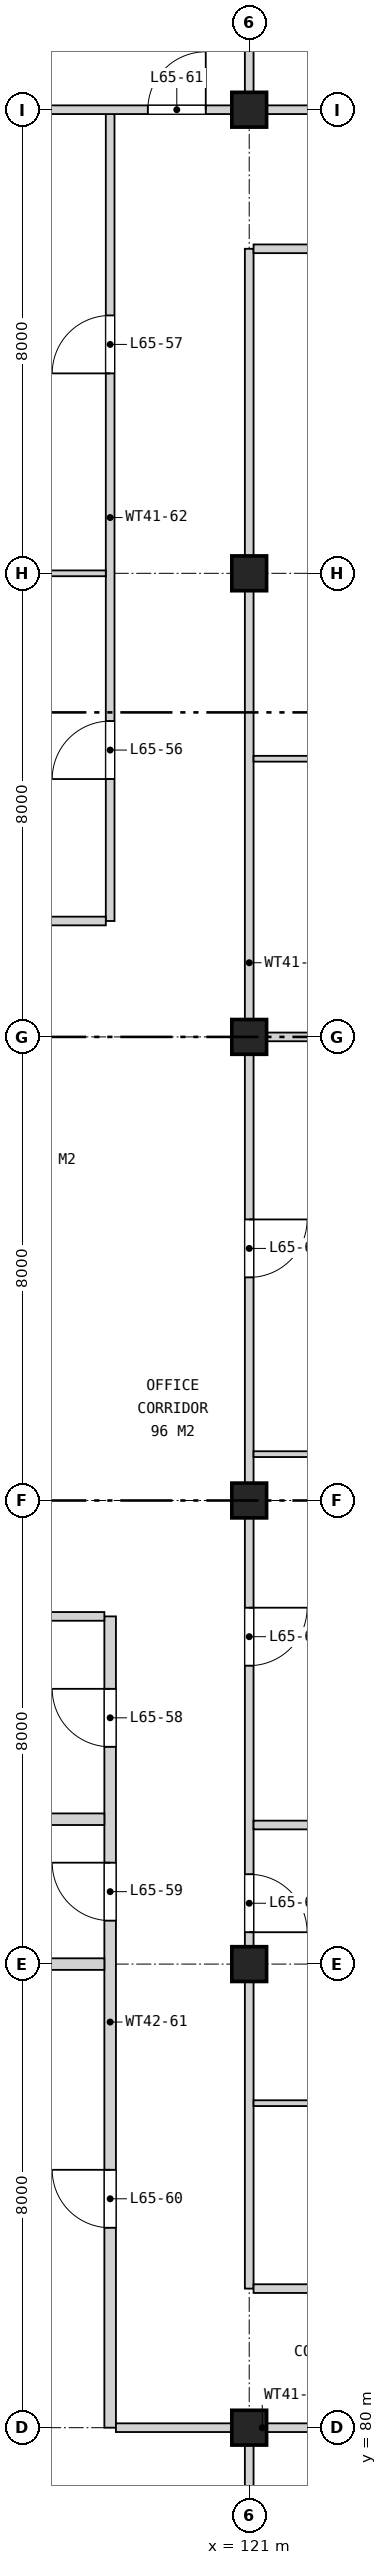
"""IFC4 building model, lengths in metres.
Left out: names, types, materials, properties, quantities, classifications, styles, units other than length and angle.
Written with IfcOpenShell. Run it as: python <this file> out.ifc"""

import sys

from ifc_helpers import new_model, si_unit, direction, frame, frame_2d, origin, origin_2d, place, context, subcontext, project, spatial, rectangle, extrude, element, fill, save


model = new_model("IFC4")
c1 = context("Model", 3, precision=1e-05, world=origin(), true_north=direction((0.0, 1.0)))
c2 = subcontext(c1, "Body", "Model", "MODEL_VIEW")
j1 = project(units=[si_unit("LENGTHUNIT", "METRE"), si_unit("PLANEANGLEUNIT", "RADIAN")], contexts=[c1])
p1 = place(None, origin())
s1 = spatial("IfcSite", under=j1, at=p1, CompositionType="ELEMENT")
p2 = place(p1, origin())
s2 = spatial("IfcBuilding", under=s1, at=p2, CompositionType="ELEMENT")
p3 = place(p2, frame((0.0, 0.0, 299.7)))
s3 = spatial("IfcBuildingStorey", under=s2, at=p3, CompositionType="ELEMENT", Elevation=299.7)
for number, where, z_axis, x_axis in (
    (1, (121.0, 80.0, 0.0), (0.0, 0.0, 1.0), (1.0, 0.0, 0.0)),
    (2, (121.0, 88.0, 0.0), (0.0, 0.0, 1.0), (1.0, 0.0, 0.0)),
    (3, (121.0, 96.0, 0.0), (0.0, 0.0, 1.0), (1.0, 0.0, 0.0)),
    (4, (121.0, 104.0, 0.0), (0.0, 0.0, 1.0), (1.0, 0.0, 0.0)),
    (5, (121.0, 112.0, 0.0), (0.0, 0.0, 1.0), (1.0, 0.0, 0.0)),
    (6, (121.0, 120.0, 0.0), (0.0, 0.0, 1.0), (1.0, 0.0, 0.0)),
):
    element("IfcColumn", number, at=place(p3, frame(where, z_axis=z_axis, x_axis=x_axis)), inside=s3, PredefinedType="COLUMN", context=c2, shape_type="SweptSolid", body=[
        extrude(rectangle(XDim=0.6, YDim=0.6, at=origin_2d()), origin(), (0.0, 0.0, 1.0), 4.2),
    ])
p4 = place(p3, frame((118.6, 80.0, 0.0), z_axis=(0.0, 0.0, 1.0), x_axis=(0.0, 1.0, 0.0)))
e7 = element("IfcWall", 7, at=p4, inside=s3, PredefinedType="SOLIDWALL", context=c2, shape_type="SweptSolid", body=[
    extrude(rectangle(XDim=14.0, YDim=0.2, at=frame_2d((7.0, 0.0))), origin(), (0.0, 0.0, 1.0), 3.255),
])
p5 = place(p4, frame((11.75, 0.0, 0.0)))
e8 = element("IfcOpeningElement", 8, at=p5, cuts=e7, PredefinedType="OPENING", context=c2, shape_type="SweptSolid", body=[
    extrude(rectangle(XDim=1.0, YDim=2.1, at=frame_2d((0.5, 1.05))), frame((0.0, 0.11, 0.0), z_axis=(0.0, -1.0, 0.0), x_axis=(1.0, 0.0, 0.0)), (0.0, 0.0, 1.0), 0.22),
])
p6 = place(p4, frame((8.75, 0.0, 0.0)))
e9 = element("IfcOpeningElement", 9, at=p6, cuts=e7, PredefinedType="OPENING", context=c2, shape_type="SweptSolid", body=[
    extrude(rectangle(XDim=1.0, YDim=2.1, at=frame_2d((0.5, 1.05))), frame((0.0, 0.11, 0.0), z_axis=(0.0, -1.0, 0.0), x_axis=(1.0, 0.0, 0.0)), (0.0, 0.0, 1.0), 0.22),
])
p7 = place(p4, frame((3.45, 0.0, 0.0)))
e10 = element("IfcOpeningElement", 10, at=p7, cuts=e7, PredefinedType="OPENING", context=c2, shape_type="SweptSolid", body=[
    extrude(rectangle(XDim=1.0, YDim=2.1, at=frame_2d((0.5, 1.05))), frame((0.0, 0.11, 0.0), z_axis=(0.0, -1.0, 0.0), x_axis=(1.0, 0.0, 0.0)), (0.0, 0.0, 1.0), 0.22),
])
p8 = place(p3, frame((118.6, 106.0, 0.0), z_axis=(0.0, 0.0, 1.0), x_axis=(0.0, 1.0, 0.0)))
e11 = element("IfcWall", 11, at=p8, inside=s3, PredefinedType="PARTITIONING", context=c2, shape_type="SweptSolid", body=[
    extrude(rectangle(XDim=13.925, YDim=0.15, at=frame_2d((6.962, 0.0))), origin(), (0.0, 0.0, 1.0), 3.255),
])
p9 = place(p8, frame((2.45, 0.0, 0.0)))
e12 = element("IfcOpeningElement", 12, at=p9, cuts=e11, PredefinedType="OPENING", context=c2, shape_type="SweptSolid", body=[
    extrude(rectangle(XDim=1.0, YDim=2.1, at=frame_2d((0.5, 1.05))), frame((0.0, 0.085, 0.0), z_axis=(0.0, -1.0, 0.0), x_axis=(1.0, 0.0, 0.0)), (0.0, 0.0, 1.0), 0.17),
])
p10 = place(p8, frame((9.45, 0.0, 0.0)))
e13 = element("IfcOpeningElement", 13, at=p10, cuts=e11, PredefinedType="OPENING", context=c2, shape_type="SweptSolid", body=[
    extrude(rectangle(XDim=1.0, YDim=2.1, at=frame_2d((0.5, 1.05))), frame((0.0, 0.085, 0.0), z_axis=(0.0, -1.0, 0.0), x_axis=(1.0, 0.0, 0.0)), (0.0, 0.0, 1.0), 0.17),
])
p11 = place(p3, frame((121.0, 71.78, 0.0), z_axis=(0.0, 0.0, 1.0), x_axis=(0.0, 1.0, 0.0)))
e14 = element("IfcWall", 14, at=p11, inside=s3, PredefinedType="PARTITIONING", context=c2, shape_type="SweptSolid", body=[
    extrude(rectangle(XDim=8.145, YDim=0.15, at=frame_2d((4.073, 0.0))), origin(), (0.0, 0.0, 1.0), 3.255),
])
p12 = place(p3, frame((121.0, 82.4, 0.0), z_axis=(0.0, 0.0, 1.0), x_axis=(0.0, 1.0, 0.0)))
e15 = element("IfcWall", 15, at=p12, inside=s3, PredefinedType="PARTITIONING", context=c2, shape_type="SweptSolid", body=[
    extrude(rectangle(XDim=35.2, YDim=0.15, at=frame_2d((17.6, 0.0))), origin(), (0.0, 0.0, 1.0), 3.255),
])
p13 = place(p12, frame((6.15, 0.0, 0.0)))
e16 = element("IfcOpeningElement", 16, at=p13, cuts=e15, PredefinedType="OPENING", context=c2, shape_type="SweptSolid", body=[
    extrude(rectangle(XDim=1.0, YDim=2.1, at=frame_2d((0.5, 1.05))), frame((0.0, 0.085, 0.0), z_axis=(0.0, -1.0, 0.0), x_axis=(1.0, 0.0, 0.0)), (0.0, 0.0, 1.0), 0.17),
])
p14 = place(p12, frame((10.75, 0.0, 0.0)))
e17 = element("IfcOpeningElement", 17, at=p14, cuts=e15, PredefinedType="OPENING", context=c2, shape_type="SweptSolid", body=[
    extrude(rectangle(XDim=1.0, YDim=2.1, at=frame_2d((0.5, 1.05))), frame((0.0, 0.085, 0.0), z_axis=(0.0, -1.0, 0.0), x_axis=(1.0, 0.0, 0.0)), (0.0, 0.0, 1.0), 0.17),
])
p15 = place(p12, frame((17.45, 0.0, 0.0)))
e18 = element("IfcOpeningElement", 18, at=p15, cuts=e15, PredefinedType="OPENING", context=c2, shape_type="SweptSolid", body=[
    extrude(rectangle(XDim=1.0, YDim=2.1, at=frame_2d((0.5, 1.05))), frame((0.0, 0.085, 0.0), z_axis=(0.0, -1.0, 0.0), x_axis=(1.0, 0.0, 0.0)), (0.0, 0.0, 1.0), 0.17),
])
p16 = place(p3, frame((121.0, 120.075, 0.0), z_axis=(0.0, 0.0, 1.0), x_axis=(0.0, 1.0, 0.0)))
e19 = element("IfcWall", 19, at=p16, inside=s3, PredefinedType="PARTITIONING", context=c2, shape_type="SweptSolid", body=[
    extrude(rectangle(XDim=8.145, YDim=0.15, at=frame_2d((4.073, 0.0))), origin(), (0.0, 0.0, 1.0), 3.255),
])
p17 = place(p3, frame((118.7, 80.0, 0.0), z_axis=(0.0, 0.0, 1.0), x_axis=(1.0, 0.0, 0.0)))
e20 = element("IfcWall", 20, at=p17, inside=s3, PredefinedType="PARTITIONING", context=c2, shape_type="SweptSolid", body=[
    extrude(rectangle(XDim=12.625, YDim=0.15, at=frame_2d((6.312, 0.0))), origin(), (0.0, 0.0, 1.0), 3.255),
])
p18 = place(p17, frame((5.85, 0.0, 0.0)))
e21 = element("IfcOpeningElement", 21, at=p18, cuts=e20, PredefinedType="OPENING", context=c2, shape_type="SweptSolid", body=[
    extrude(rectangle(XDim=1.0, YDim=2.1, at=frame_2d((0.5, 1.05))), frame((0.0, 0.085, 0.0), z_axis=(0.0, -1.0, 0.0), x_axis=(1.0, 0.0, 0.0)), (0.0, 0.0, 1.0), 0.17),
])
p19 = place(p3, frame((121.075, 82.4, 0.0), z_axis=(0.0, 0.0, 1.0), x_axis=(1.0, 0.0, 0.0)))
e22 = element("IfcWall", 22, at=p19, inside=s3, PredefinedType="PARTITIONING", context=c2, shape_type="SweptSolid", body=[
    extrude(rectangle(XDim=7.85, YDim=0.15, at=frame_2d((3.925, 0.0))), origin(), (0.0, 0.0, 1.0), 3.255),
])
p20 = place(p19, frame((3.45, 0.0, 0.0)))
e23 = element("IfcOpeningElement", 23, at=p20, cuts=e22, PredefinedType="OPENING", context=c2, shape_type="SweptSolid", body=[
    extrude(rectangle(XDim=1.0, YDim=2.1, at=frame_2d((0.5, 1.05))), frame((0.0, 0.085, 0.0), z_axis=(0.0, -1.0, 0.0), x_axis=(1.0, 0.0, 0.0)), (0.0, 0.0, 1.0), 0.17),
])
p21 = place(p3, frame((121.075, 85.6, 0.0), z_axis=(0.0, 0.0, 1.0), x_axis=(1.0, 0.0, 0.0)))
e24 = element("IfcWall", 24, at=p21, inside=s3, PredefinedType="PARTITIONING", context=c2, shape_type="SweptSolid", body=[
    extrude(rectangle(XDim=7.85, YDim=0.1, at=frame_2d((3.925, 0.0))), origin(), (0.0, 0.0, 1.0), 3.255),
])
p22 = place(p3, frame((113.0, 88.0, 0.0), z_axis=(0.0, 0.0, 1.0), x_axis=(1.0, 0.0, 0.0)))
e25 = element("IfcWall", 25, at=p22, inside=s3, PredefinedType="SOLIDWALL", context=c2, shape_type="SweptSolid", body=[
    extrude(rectangle(XDim=5.5, YDim=0.2, at=frame_2d((2.75, 0.0))), origin(), (0.0, 0.0, 1.0), 3.255),
])
p23 = place(p3, frame((121.075, 90.4, 0.0), z_axis=(0.0, 0.0, 1.0), x_axis=(1.0, 0.0, 0.0)))
e26 = element("IfcWall", 26, at=p23, inside=s3, PredefinedType="PARTITIONING", context=c2, shape_type="SweptSolid", body=[
    extrude(rectangle(XDim=7.85, YDim=0.15, at=frame_2d((3.925, 0.0))), origin(), (0.0, 0.0, 1.0), 3.255),
])
p24 = place(p3, frame((113.0, 90.5, 0.0), z_axis=(0.0, 0.0, 1.0), x_axis=(1.0, 0.0, 0.0)))
e27 = element("IfcWall", 27, at=p24, inside=s3, PredefinedType="SOLIDWALL", context=c2, shape_type="SweptSolid", body=[
    extrude(rectangle(XDim=5.5, YDim=0.2, at=frame_2d((2.75, 0.0))), origin(), (0.0, 0.0, 1.0), 3.255),
])
p25 = place(p3, frame((113.0, 94.0, 0.0), z_axis=(0.0, 0.0, 1.0), x_axis=(1.0, 0.0, 0.0)))
e28 = element("IfcWall", 28, at=p25, inside=s3, PredefinedType="PARTITIONING", context=c2, shape_type="SweptSolid", body=[
    extrude(rectangle(XDim=5.5, YDim=0.15, at=frame_2d((2.75, 0.0))), origin(), (0.0, 0.0, 1.0), 3.255),
])
p26 = place(p3, frame((121.075, 104.0, 0.0), z_axis=(0.0, 0.0, 1.0), x_axis=(1.0, 0.0, 0.0)))
e29 = element("IfcWall", 29, at=p26, inside=s3, PredefinedType="PARTITIONING", context=c2, shape_type="SweptSolid", body=[
    extrude(rectangle(XDim=7.85, YDim=0.15, at=frame_2d((3.925, 0.0))), origin(), (0.0, 0.0, 1.0), 3.255),
])
p27 = place(p3, frame((113.0, 106.0, 0.0), z_axis=(0.0, 0.0, 1.0), x_axis=(1.0, 0.0, 0.0)))
e30 = element("IfcWall", 30, at=p27, inside=s3, PredefinedType="PARTITIONING", context=c2, shape_type="SweptSolid", body=[
    extrude(rectangle(XDim=5.525, YDim=0.15, at=frame_2d((2.762, 0.0))), origin(), (0.0, 0.0, 1.0), 3.255),
])
p28 = place(p3, frame((121.075, 108.8, 0.0), z_axis=(0.0, 0.0, 1.0), x_axis=(1.0, 0.0, 0.0)))
e31 = element("IfcWall", 31, at=p28, inside=s3, PredefinedType="PARTITIONING", context=c2, shape_type="SweptSolid", body=[
    extrude(rectangle(XDim=7.85, YDim=0.1, at=frame_2d((3.925, 0.0))), origin(), (0.0, 0.0, 1.0), 3.255),
])
p29 = place(p3, frame((113.0, 112.0, 0.0), z_axis=(0.0, 0.0, 1.0), x_axis=(1.0, 0.0, 0.0)))
e32 = element("IfcWall", 32, at=p29, inside=s3, PredefinedType="PARTITIONING", context=c2, shape_type="SweptSolid", body=[
    extrude(rectangle(XDim=5.525, YDim=0.1, at=frame_2d((2.762, 0.0))), origin(), (0.0, 0.0, 1.0), 3.255),
])
p30 = place(p3, frame((121.075, 117.6, 0.0), z_axis=(0.0, 0.0, 1.0), x_axis=(1.0, 0.0, 0.0)))
e33 = element("IfcWall", 33, at=p30, inside=s3, PredefinedType="PARTITIONING", context=c2, shape_type="SweptSolid", body=[
    extrude(rectangle(XDim=7.85, YDim=0.15, at=frame_2d((3.925, 0.0))), origin(), (0.0, 0.0, 1.0), 3.255),
])
p31 = place(p30, frame((3.45, 0.0, 0.0)))
e34 = element("IfcOpeningElement", 34, at=p31, cuts=e33, PredefinedType="OPENING", context=c2, shape_type="SweptSolid", body=[
    extrude(rectangle(XDim=1.0, YDim=2.1, at=frame_2d((0.5, 1.05))), frame((0.0, 0.085, 0.0), z_axis=(0.0, -1.0, 0.0), x_axis=(1.0, 0.0, 0.0)), (0.0, 0.0, 1.0), 0.17),
])
p32 = place(p3, frame((112.78, 120.0, 0.0), z_axis=(0.0, 0.0, 1.0), x_axis=(1.0, 0.0, 0.0)))
e35 = element("IfcWall", 35, at=p32, inside=s3, PredefinedType="PARTITIONING", context=c2, shape_type="SweptSolid", body=[
    extrude(rectangle(XDim=24.44, YDim=0.15, at=frame_2d((12.22, 0.0))), origin(), (0.0, 0.0, 1.0), 3.255),
])
p33 = place(p32, frame((6.47, 0.0, 0.0)))
e36 = element("IfcOpeningElement", 36, at=p33, cuts=e35, PredefinedType="OPENING", context=c2, shape_type="SweptSolid", body=[
    extrude(rectangle(XDim=1.0, YDim=2.1, at=frame_2d((0.5, 1.05))), frame((0.0, 0.085, 0.0), z_axis=(0.0, -1.0, 0.0), x_axis=(1.0, 0.0, 0.0)), (0.0, 0.0, 1.0), 0.17),
])
p34 = place(p32, frame((11.27, 0.0, 0.0)))
e37 = element("IfcOpeningElement", 37, at=p34, cuts=e35, PredefinedType="OPENING", context=c2, shape_type="SweptSolid", body=[
    extrude(rectangle(XDim=1.8, YDim=2.1, at=frame_2d((0.9, 1.05))), frame((0.0, 0.085, 0.0), z_axis=(0.0, -1.0, 0.0), x_axis=(1.0, 0.0, 0.0)), (0.0, 0.0, 1.0), 0.17),
])
p35 = place(p3, frame((121.075, 96.8, 0.0), z_axis=(0.0, 0.0, 1.0), x_axis=(1.0, 0.0, 0.0)))
e38 = element("IfcWall", 38, at=p35, inside=s3, PredefinedType="PARTITIONING", context=c2, shape_type="SweptSolid", body=[
    extrude(rectangle(XDim=3.85, YDim=0.1, at=frame_2d((1.925, 0.0))), origin(), (0.0, 0.0, 1.0), 3.255),
])
p36 = place(p9, origin())
e39 = element("IfcDoor", 39, at=p36, inside=s3, OperationType="SINGLE_SWING_LEFT", PredefinedType="DOOR", context=c2, shape_type="SweptSolid", body=[
    extrude(rectangle(XDim=1.0, YDim=2.1, at=frame_2d((0.5, 1.05))), frame((0.0, 0.025, 0.0), z_axis=(0.0, -1.0, 0.0), x_axis=(1.0, 0.0, 0.0)), (0.0, 0.0, 1.0), 0.05),
])
fill(e12, e39)
p37 = place(p10, origin())
e40 = element("IfcDoor", 40, at=p37, inside=s3, OperationType="SINGLE_SWING_LEFT", PredefinedType="DOOR", context=c2, shape_type="SweptSolid", body=[
    extrude(rectangle(XDim=1.0, YDim=2.1, at=frame_2d((0.5, 1.05))), frame((0.0, 0.025, 0.0), z_axis=(0.0, -1.0, 0.0), x_axis=(1.0, 0.0, 0.0)), (0.0, 0.0, 1.0), 0.05),
])
fill(e13, e40)
p38 = place(p5, origin())
e41 = element("IfcDoor", 41, at=p38, inside=s3, OperationType="SINGLE_SWING_RIGHT", PredefinedType="DOOR", context=c2, shape_type="SweptSolid", body=[
    extrude(rectangle(XDim=1.0, YDim=2.1, at=frame_2d((0.5, 1.05))), frame((0.0, 0.025, 0.0), z_axis=(0.0, -1.0, 0.0), x_axis=(1.0, 0.0, 0.0)), (0.0, 0.0, 1.0), 0.05),
])
fill(e8, e41)
p39 = place(p6, origin())
e42 = element("IfcDoor", 42, at=p39, inside=s3, OperationType="SINGLE_SWING_RIGHT", PredefinedType="DOOR", context=c2, shape_type="SweptSolid", body=[
    extrude(rectangle(XDim=1.0, YDim=2.1, at=frame_2d((0.5, 1.05))), frame((0.0, 0.025, 0.0), z_axis=(0.0, -1.0, 0.0), x_axis=(1.0, 0.0, 0.0)), (0.0, 0.0, 1.0), 0.05),
])
fill(e9, e42)
p40 = place(p7, origin())
e43 = element("IfcDoor", 43, at=p40, inside=s3, OperationType="SINGLE_SWING_RIGHT", PredefinedType="DOOR", context=c2, shape_type="SweptSolid", body=[
    extrude(rectangle(XDim=1.0, YDim=2.1, at=frame_2d((0.5, 1.05))), frame((0.0, 0.025, 0.0), z_axis=(0.0, -1.0, 0.0), x_axis=(1.0, 0.0, 0.0)), (0.0, 0.0, 1.0), 0.05),
])
fill(e10, e43)
p41 = place(p33, origin())
e44 = element("IfcDoor", 44, at=p41, inside=s3, OperationType="SINGLE_SWING_RIGHT", PredefinedType="DOOR", context=c2, shape_type="SweptSolid", body=[
    extrude(rectangle(XDim=1.0, YDim=2.1, at=frame_2d((0.5, 1.05))), frame((0.0, 0.025, 0.0), z_axis=(0.0, -1.0, 0.0), x_axis=(1.0, 0.0, 0.0)), (0.0, 0.0, 1.0), 0.05),
])
fill(e36, e44)
p42 = place(p13, frame((1.0, 0.0, 0.0), z_axis=(0.0, 0.0, 1.0), x_axis=(-1.0, 0.0, 0.0)))
e45 = element("IfcDoor", 45, at=p42, inside=s3, OperationType="SINGLE_SWING_RIGHT", PredefinedType="DOOR", context=c2, shape_type="SweptSolid", body=[
    extrude(rectangle(XDim=1.0, YDim=2.1, at=frame_2d((0.5, 1.05))), frame((0.0, 0.025, 0.0), z_axis=(0.0, -1.0, 0.0), x_axis=(1.0, 0.0, 0.0)), (0.0, 0.0, 1.0), 0.05),
])
fill(e16, e45)
p43 = place(p14, frame((1.0, 0.0, 0.0), z_axis=(0.0, 0.0, 1.0), x_axis=(-1.0, 0.0, 0.0)))
e46 = element("IfcDoor", 46, at=p43, inside=s3, OperationType="SINGLE_SWING_LEFT", PredefinedType="DOOR", context=c2, shape_type="SweptSolid", body=[
    extrude(rectangle(XDim=1.0, YDim=2.1, at=frame_2d((0.5, 1.05))), frame((0.0, 0.025, 0.0), z_axis=(0.0, -1.0, 0.0), x_axis=(1.0, 0.0, 0.0)), (0.0, 0.0, 1.0), 0.05),
])
fill(e17, e46)
p44 = place(p15, frame((1.0, 0.0, 0.0), z_axis=(0.0, 0.0, 1.0), x_axis=(-1.0, 0.0, 0.0)))
e47 = element("IfcDoor", 47, at=p44, inside=s3, OperationType="SINGLE_SWING_LEFT", PredefinedType="DOOR", context=c2, shape_type="SweptSolid", body=[
    extrude(rectangle(XDim=1.0, YDim=2.1, at=frame_2d((0.5, 1.05))), frame((0.0, 0.025, 0.0), z_axis=(0.0, -1.0, 0.0), x_axis=(1.0, 0.0, 0.0)), (0.0, 0.0, 1.0), 0.05),
])
fill(e18, e47)
save(model, sys.argv[1])
